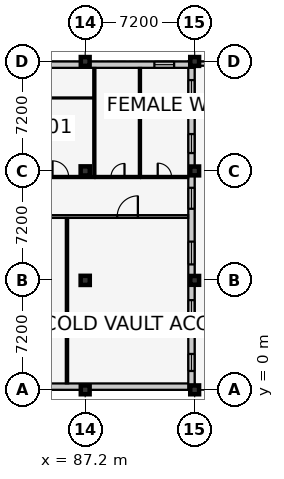
"""IFC4 building model, lengths in metres.
Left out: names, types, materials, properties, quantities, classifications, styles, units other than length and angle.
Written with IfcOpenShell. Run it as: python <this file> out.ifc"""

import sys

from ifc_helpers import new_model, si_unit, direction, frame, frame_2d, origin, origin_2d, place, context, subcontext, project, spatial, rectangle, extrude, element, fill, save


model = new_model("IFC4")
c1 = context("Model", 3, precision=1e-05, world=origin(), true_north=direction((0.0, 1.0)))
c2 = subcontext(c1, "Body", "Model", "MODEL_VIEW")
j1 = project(units=[si_unit("LENGTHUNIT", "METRE"), si_unit("PLANEANGLEUNIT", "RADIAN")], contexts=[c1])
p1 = place(None, origin())
s1 = spatial("IfcSite", under=j1, at=p1, CompositionType="ELEMENT")
p2 = place(p1, origin())
s2 = spatial("IfcBuilding", under=s1, at=p2, CompositionType="ELEMENT")
p3 = place(p2, frame((0.0, 0.0, 13.8)))
s3 = spatial("IfcBuildingStorey", under=s2, at=p3, CompositionType="ELEMENT", Elevation=13.8)
p4 = place(p3, frame((87.2, 0.0, 0.0), z_axis=(0.0, 0.0, 1.0), x_axis=(1.0, 0.0, 0.0)))
e1 = element("IfcColumn", 1, at=p4, inside=s3, PredefinedType="COLUMN", context=c2, shape_type="SweptSolid", body=[
    extrude(rectangle(XDim=0.58, YDim=0.58, at=origin_2d()), origin(), (0.0, 0.0, 1.0), 4.2),
])
for number, where, z_axis, x_axis in (
    (2, (87.2, 7.2, 0.0), (0.0, 0.0, 1.0), (1.0, 0.0, 0.0)),
    (3, (87.2, 14.4, 0.0), (0.0, 0.0, 1.0), (1.0, 0.0, 0.0)),
):
    element("IfcColumn", number, at=place(p3, frame(where, z_axis=z_axis, x_axis=x_axis)), inside=s3, PredefinedType="COLUMN", context=c2, shape_type="SweptSolid", body=[
        extrude(rectangle(XDim=0.6, YDim=0.6, at=origin_2d()), origin(), (0.0, 0.0, 1.0), 4.2),
    ])
for number, where, z_axis, x_axis in (
    (4, (87.2, 21.6, 0.0), (0.0, 0.0, 1.0), (1.0, 0.0, 0.0)),
    (5, (94.4, 0.0, 0.0), (0.0, 0.0, 1.0), (1.0, 0.0, 0.0)),
    (6, (94.4, 7.2, 0.0), (0.0, 0.0, 1.0), (1.0, 0.0, 0.0)),
    (7, (94.4, 14.4, 0.0), (0.0, 0.0, 1.0), (1.0, 0.0, 0.0)),
    (8, (94.4, 21.6, 0.0), (0.0, 0.0, 1.0), (1.0, 0.0, 0.0)),
):
    element("IfcColumn", number, at=place(p3, frame(where, z_axis=z_axis, x_axis=x_axis)), inside=s3, PredefinedType="COLUMN", context=c2, shape_type="SweptSolid", body=[
        extrude(rectangle(XDim=0.58, YDim=0.58, at=origin_2d()), origin(), (0.0, 0.0, 1.0), 4.2),
    ])
p5 = place(p3, frame((94.4, 0.21, 0.0), z_axis=(0.0, 0.0, 1.0), x_axis=(-1.0, 0.0, 0.0)))
e9 = element("IfcWall", 9, at=p5, inside=s3, PredefinedType="SOLIDWALL", context=c2, shape_type="SweptSolid", body=[
    extrude(rectangle(XDim=36.0, YDim=0.42, at=frame_2d((18.0, 0.0))), origin(), (0.0, 0.0, 1.0), 3.175),
])
p6 = place(p3, frame((94.19, 21.6, 0.0), z_axis=(0.0, 0.0, 1.0), x_axis=(0.0, -1.0, 0.0)))
e10 = element("IfcWall", 10, at=p6, inside=s3, PredefinedType="SOLIDWALL", context=c2, shape_type="SweptSolid", body=[
    extrude(rectangle(XDim=21.6, YDim=0.42, at=frame_2d((10.8, 0.0))), origin(), (0.0, 0.0, 1.0), 3.135),
])
p7 = place(p6, frame((1.225, 0.0, 0.9)))
e11 = element("IfcOpeningElement", 11, at=p7, cuts=e10, PredefinedType="OPENING", context=c2, shape_type="SweptSolid", body=[
    extrude(rectangle(XDim=1.15, YDim=1.6, at=frame_2d((0.575, 0.8))), frame((0.0, 0.222, 0.0), z_axis=(0.0, -1.0, 0.0), x_axis=(1.0, 0.0, 0.0)), (0.0, 0.0, 1.0), 0.444),
])
p8 = place(p6, frame((4.775, 0.0, 0.9)))
e12 = element("IfcOpeningElement", 12, at=p8, cuts=e10, PredefinedType="OPENING", context=c2, shape_type="SweptSolid", body=[
    extrude(rectangle(XDim=1.25, YDim=1.6, at=frame_2d((0.625, 0.8))), frame((0.0, 0.222, 0.0), z_axis=(0.0, -1.0, 0.0), x_axis=(1.0, 0.0, 0.0)), (0.0, 0.0, 1.0), 0.444),
])
p9 = place(p6, frame((8.31, 0.0, 0.9)))
e13 = element("IfcOpeningElement", 13, at=p9, cuts=e10, PredefinedType="OPENING", context=c2, shape_type="SweptSolid", body=[
    extrude(rectangle(XDim=1.38, YDim=1.6, at=frame_2d((0.69, 0.8))), frame((0.0, 0.222, 0.0), z_axis=(0.0, -1.0, 0.0), x_axis=(1.0, 0.0, 0.0)), (0.0, 0.0, 1.0), 0.444),
])
p10 = place(p6, frame((11.85, 0.0, 0.9)))
e14 = element("IfcOpeningElement", 14, at=p10, cuts=e10, PredefinedType="OPENING", context=c2, shape_type="SweptSolid", body=[
    extrude(rectangle(XDim=1.5, YDim=1.6, at=frame_2d((0.75, 0.8))), frame((0.0, 0.222, 0.0), z_axis=(0.0, -1.0, 0.0), x_axis=(1.0, 0.0, 0.0)), (0.0, 0.0, 1.0), 0.444),
])
p11 = place(p6, frame((15.7, 0.0, 0.9)))
e15 = element("IfcOpeningElement", 15, at=p11, cuts=e10, PredefinedType="OPENING", context=c2, shape_type="SweptSolid", body=[
    extrude(rectangle(XDim=1.0, YDim=1.75, at=frame_2d((0.5, 0.875))), frame((0.0, 0.222, 0.0), z_axis=(0.0, -1.0, 0.0), x_axis=(1.0, 0.0, 0.0)), (0.0, 0.0, 1.0), 0.444),
])
p12 = place(p6, frame((19.24, 0.0, 0.9)))
e16 = element("IfcOpeningElement", 16, at=p12, cuts=e10, PredefinedType="OPENING", context=c2, shape_type="SweptSolid", body=[
    extrude(rectangle(XDim=1.12, YDim=1.75, at=frame_2d((0.56, 0.875))), frame((0.0, 0.222, 0.0), z_axis=(0.0, -1.0, 0.0), x_axis=(1.0, 0.0, 0.0)), (0.0, 0.0, 1.0), 0.444),
])
p13 = place(p3, frame((58.4, 21.39, 0.0), z_axis=(0.0, 0.0, 1.0), x_axis=(1.0, 0.0, 0.0)))
e17 = element("IfcWall", 17, at=p13, inside=s3, PredefinedType="SOLIDWALL", context=c2, shape_type="SweptSolid", body=[
    extrude(rectangle(XDim=36.0, YDim=0.42, at=frame_2d((18.0, 0.0))), origin(), (0.0, 0.0, 1.0), 3.175),
])
p14 = place(p13, frame((1.38, 0.0, 0.9)))
e18 = element("IfcOpeningElement", 18, at=p14, cuts=e17, PredefinedType="OPENING", context=c2, shape_type="SweptSolid", body=[
    extrude(rectangle(XDim=1.24, YDim=1.75, at=frame_2d((0.62, 0.875))), frame((0.0, 0.222, 0.0), z_axis=(0.0, -1.0, 0.0), x_axis=(1.0, 0.0, 0.0)), (0.0, 0.0, 1.0), 0.444),
])
p15 = place(p13, frame((9.28, 0.0, 0.9)))
e19 = element("IfcOpeningElement", 19, at=p15, cuts=e17, PredefinedType="OPENING", context=c2, shape_type="SweptSolid", body=[
    extrude(rectangle(XDim=1.44, YDim=1.75, at=frame_2d((0.72, 0.875))), frame((0.0, 0.222, 0.0), z_axis=(0.0, -1.0, 0.0), x_axis=(1.0, 0.0, 0.0)), (0.0, 0.0, 1.0), 0.444),
])
p16 = place(p13, frame((17.55, 0.0, 0.9)))
e20 = element("IfcOpeningElement", 20, at=p16, cuts=e17, PredefinedType="OPENING", context=c2, shape_type="SweptSolid", body=[
    extrude(rectangle(XDim=0.9, YDim=1.35, at=frame_2d((0.45, 0.675))), frame((0.0, 0.222, 0.0), z_axis=(0.0, -1.0, 0.0), x_axis=(1.0, 0.0, 0.0)), (0.0, 0.0, 1.0), 0.444),
])
p17 = place(p13, frame((33.35, 0.0, 0.9)))
e21 = element("IfcOpeningElement", 21, at=p17, cuts=e17, PredefinedType="OPENING", context=c2, shape_type="SweptSolid", body=[
    extrude(rectangle(XDim=1.3, YDim=1.35, at=frame_2d((0.65, 0.675))), frame((0.0, 0.222, 0.0), z_axis=(0.0, -1.0, 0.0), x_axis=(1.0, 0.0, 0.0)), (0.0, 0.0, 1.0), 0.444),
])
p18 = place(p3, frame((94.55, 21.46, 0.0), z_axis=(0.0, 0.0, 1.0), x_axis=(1.0, 0.0, 0.0)))
e22 = element("IfcWall", 22, at=p18, inside=s3, PredefinedType="PARAPET", context=c2, shape_type="SweptSolid", body=[
    extrude(rectangle(XDim=6.9, YDim=0.28, at=frame_2d((3.45, 0.0))), origin(), (0.0, 0.0, 1.0), 0.65),
])
p19 = place(p3, frame((58.83, 11.4, 0.0), z_axis=(0.0, 0.0, 1.0), x_axis=(1.0, 0.0, 0.0)))
e23 = element("IfcWall", 23, at=p19, inside=s3, PredefinedType="PARTITIONING", context=c2, shape_type="SweptSolid", body=[
    extrude(rectangle(XDim=35.14, YDim=0.18, at=frame_2d((17.57, 0.0))), origin(), (0.0, 0.0, 1.0), 3.88),
])
p20 = place(p19, frame((6.995, 0.0, 0.0)))
e24 = element("IfcOpeningElement", 24, at=p20, cuts=e23, PredefinedType="OPENING", context=c2, shape_type="SweptSolid", body=[
    extrude(rectangle(XDim=1.18, YDim=2.2, at=frame_2d((0.59, 1.1))), frame((0.0, 0.102, 0.0), z_axis=(0.0, -1.0, 0.0), x_axis=(1.0, 0.0, 0.0)), (0.0, 0.0, 1.0), 0.204),
])
p21 = place(p19, frame((20.61, 0.0, 0.0)))
e25 = element("IfcOpeningElement", 25, at=p21, cuts=e23, PredefinedType="OPENING", context=c2, shape_type="SweptSolid", body=[
    extrude(rectangle(XDim=1.12, YDim=2.15, at=frame_2d((0.56, 1.075))), frame((0.0, 0.102, 0.0), z_axis=(0.0, -1.0, 0.0), x_axis=(1.0, 0.0, 0.0)), (0.0, 0.0, 1.0), 0.204),
])
p22 = place(p19, frame((30.475, 0.0, 0.0)))
e26 = element("IfcOpeningElement", 26, at=p22, cuts=e23, PredefinedType="OPENING", context=c2, shape_type="SweptSolid", body=[
    extrude(rectangle(XDim=1.36, YDim=2.2, at=frame_2d((0.68, 1.1))), frame((0.0, 0.102, 0.0), z_axis=(0.0, -1.0, 0.0), x_axis=(1.0, 0.0, 0.0)), (0.0, 0.0, 1.0), 0.204),
])
p23 = place(p3, frame((86.0, 0.43, 0.0), z_axis=(0.0, 0.0, 1.0), x_axis=(0.0, 1.0, 0.0)))
e27 = element("IfcWall", 27, at=p23, inside=s3, PredefinedType="PARTITIONING", context=c2, shape_type="SweptSolid", body=[
    extrude(rectangle(XDim=10.87, YDim=0.15, at=frame_2d((5.435, 0.0))), origin(), (0.0, 0.0, 1.0), 3.88),
])
p24 = place(p3, frame((84.8, 14.0, 0.0), z_axis=(0.0, 0.0, 1.0), x_axis=(1.0, 0.0, 0.0)))
e28 = element("IfcWall", 28, at=p24, inside=s3, PredefinedType="PARTITIONING", context=c2, shape_type="SweptSolid", body=[
    extrude(rectangle(XDim=3.0, YDim=0.14, at=frame_2d((1.5, 0.0))), origin(), (0.0, 0.0, 1.0), 3.88),
])
p25 = place(p24, frame((0.25, 0.0, 0.0)))
e29 = element("IfcOpeningElement", 29, at=p25, cuts=e28, PredefinedType="OPENING", context=c2, shape_type="SweptSolid", body=[
    extrude(rectangle(XDim=1.06, YDim=2.1, at=frame_2d((0.53, 1.05))), frame((0.0, 0.082, 0.0), z_axis=(0.0, -1.0, 0.0), x_axis=(1.0, 0.0, 0.0)), (0.0, 0.0, 1.0), 0.164),
])
p26 = place(p3, frame((87.8, 14.08, 0.0), z_axis=(0.0, 0.0, 1.0), x_axis=(0.0, 1.0, 0.0)))
e30 = element("IfcWall", 30, at=p26, inside=s3, PredefinedType="PARTITIONING", context=c2, shape_type="SweptSolid", body=[
    extrude(rectangle(XDim=7.09, YDim=0.14, at=frame_2d((3.545, 0.0))), origin(), (0.0, 0.0, 1.0), 3.88),
])
p27 = place(p3, frame((87.88, 14.0, 0.0), z_axis=(0.0, 0.0, 1.0), x_axis=(1.0, 0.0, 0.0)))
e31 = element("IfcWall", 31, at=p27, inside=s3, PredefinedType="PARTITIONING", context=c2, shape_type="SweptSolid", body=[
    extrude(rectangle(XDim=2.92, YDim=0.14, at=frame_2d((1.46, 0.0))), origin(), (0.0, 0.0, 1.0), 3.88),
])
p28 = place(p27, frame((1.015, 0.0, 0.0)))
e32 = element("IfcOpeningElement", 32, at=p28, cuts=e31, PredefinedType="OPENING", context=c2, shape_type="SweptSolid", body=[
    extrude(rectangle(XDim=0.89, YDim=2.05, at=frame_2d((0.445, 1.025))), frame((0.0, 0.082, 0.0), z_axis=(0.0, -1.0, 0.0), x_axis=(1.0, 0.0, 0.0)), (0.0, 0.0, 1.0), 0.164),
])
p29 = place(p3, frame((90.8, 14.08, 0.0), z_axis=(0.0, 0.0, 1.0), x_axis=(0.0, 1.0, 0.0)))
e33 = element("IfcWall", 33, at=p29, inside=s3, PredefinedType="PARTITIONING", context=c2, shape_type="SweptSolid", body=[
    extrude(rectangle(XDim=7.09, YDim=0.14, at=frame_2d((3.545, 0.0))), origin(), (0.0, 0.0, 1.0), 3.495),
])
p30 = place(p3, frame((90.88, 14.0, 0.0), z_axis=(0.0, 0.0, 1.0), x_axis=(1.0, 0.0, 0.0)))
e34 = element("IfcWall", 34, at=p30, inside=s3, PredefinedType="PARTITIONING", context=c2, shape_type="SweptSolid", body=[
    extrude(rectangle(XDim=3.09, YDim=0.14, at=frame_2d((1.545, 0.0))), origin(), (0.0, 0.0, 1.0), 3.88),
])
p31 = place(p30, frame((1.09, 0.0, 0.0)))
e35 = element("IfcOpeningElement", 35, at=p31, cuts=e34, PredefinedType="OPENING", context=c2, shape_type="SweptSolid", body=[
    extrude(rectangle(XDim=0.91, YDim=2.06, at=frame_2d((0.455, 1.03))), frame((0.0, 0.082, 0.0), z_axis=(0.0, -1.0, 0.0), x_axis=(1.0, 0.0, 0.0)), (0.0, 0.0, 1.0), 0.164),
])
p32 = place(p7, origin())
e36 = element("IfcWindow", 36, at=p32, inside=s3, PartitioningType="SINGLE_PANEL", PredefinedType="WINDOW", context=c2, shape_type="SweptSolid", body=[
    extrude(rectangle(XDim=1.15, YDim=1.6, at=frame_2d((0.575, 0.8))), frame((0.0, 0.03, 0.0), z_axis=(0.0, -1.0, 0.0), x_axis=(1.0, 0.0, 0.0)), (0.0, 0.0, 1.0), 0.06),
])
fill(e11, e36)
p33 = place(p8, origin())
e37 = element("IfcWindow", 37, at=p33, inside=s3, PartitioningType="SINGLE_PANEL", PredefinedType="WINDOW", context=c2, shape_type="SweptSolid", body=[
    extrude(rectangle(XDim=1.25, YDim=1.6, at=frame_2d((0.625, 0.8))), frame((0.0, 0.03, 0.0), z_axis=(0.0, -1.0, 0.0), x_axis=(1.0, 0.0, 0.0)), (0.0, 0.0, 1.0), 0.06),
])
fill(e12, e37)
p34 = place(p9, origin())
e38 = element("IfcWindow", 38, at=p34, inside=s3, PartitioningType="SINGLE_PANEL", PredefinedType="WINDOW", context=c2, shape_type="SweptSolid", body=[
    extrude(rectangle(XDim=1.38, YDim=1.6, at=frame_2d((0.69, 0.8))), frame((0.0, 0.03, 0.0), z_axis=(0.0, -1.0, 0.0), x_axis=(1.0, 0.0, 0.0)), (0.0, 0.0, 1.0), 0.06),
])
fill(e13, e38)
p35 = place(p10, origin())
e39 = element("IfcWindow", 39, at=p35, inside=s3, PartitioningType="SINGLE_PANEL", PredefinedType="WINDOW", context=c2, shape_type="SweptSolid", body=[
    extrude(rectangle(XDim=1.5, YDim=1.6, at=frame_2d((0.75, 0.8))), frame((0.0, 0.03, 0.0), z_axis=(0.0, -1.0, 0.0), x_axis=(1.0, 0.0, 0.0)), (0.0, 0.0, 1.0), 0.06),
])
fill(e14, e39)
p36 = place(p11, origin())
e40 = element("IfcWindow", 40, at=p36, inside=s3, PartitioningType="SINGLE_PANEL", PredefinedType="WINDOW", context=c2, shape_type="SweptSolid", body=[
    extrude(rectangle(XDim=1.0, YDim=1.75, at=frame_2d((0.5, 0.875))), frame((0.0, 0.03, 0.0), z_axis=(0.0, -1.0, 0.0), x_axis=(1.0, 0.0, 0.0)), (0.0, 0.0, 1.0), 0.06),
])
fill(e15, e40)
p37 = place(p12, origin())
e41 = element("IfcWindow", 41, at=p37, inside=s3, PartitioningType="SINGLE_PANEL", PredefinedType="WINDOW", context=c2, shape_type="SweptSolid", body=[
    extrude(rectangle(XDim=1.12, YDim=1.75, at=frame_2d((0.56, 0.875))), frame((0.0, 0.03, 0.0), z_axis=(0.0, -1.0, 0.0), x_axis=(1.0, 0.0, 0.0)), (0.0, 0.0, 1.0), 0.06),
])
fill(e16, e41)
p38 = place(p17, origin())
e42 = element("IfcWindow", 42, at=p38, inside=s3, PartitioningType="SINGLE_PANEL", PredefinedType="WINDOW", context=c2, shape_type="SweptSolid", body=[
    extrude(rectangle(XDim=1.3, YDim=1.35, at=frame_2d((0.65, 0.675))), frame((0.0, 0.03, 0.0), z_axis=(0.0, -1.0, 0.0), x_axis=(1.0, 0.0, 0.0)), (0.0, 0.0, 1.0), 0.06),
])
fill(e21, e42)
p39 = place(p22, origin())
e43 = element("IfcDoor", 43, at=p39, inside=s3, OperationType="SINGLE_SWING_RIGHT", PredefinedType="DOOR", context=c2, shape_type="SweptSolid", body=[
    extrude(rectangle(XDim=1.36, YDim=2.2, at=frame_2d((0.68, 1.1))), frame((0.0, 0.025, 0.0), z_axis=(0.0, -1.0, 0.0), x_axis=(1.0, 0.0, 0.0)), (0.0, 0.0, 1.0), 0.05),
])
fill(e26, e43)
p40 = place(p25, origin())
e44 = element("IfcDoor", 44, at=p40, inside=s3, OperationType="SINGLE_SWING_LEFT", PredefinedType="DOOR", context=c2, shape_type="SweptSolid", body=[
    extrude(rectangle(XDim=1.06, YDim=2.1, at=frame_2d((0.53, 1.05))), frame((0.0, 0.025, 0.0), z_axis=(0.0, -1.0, 0.0), x_axis=(1.0, 0.0, 0.0)), (0.0, 0.0, 1.0), 0.05),
])
fill(e29, e44)
p41 = place(p28, origin())
e45 = element("IfcDoor", 45, at=p41, inside=s3, OperationType="SINGLE_SWING_RIGHT", PredefinedType="DOOR", context=c2, shape_type="SweptSolid", body=[
    extrude(rectangle(XDim=0.89, YDim=2.05, at=frame_2d((0.445, 1.025))), frame((0.0, 0.025, 0.0), z_axis=(0.0, -1.0, 0.0), x_axis=(1.0, 0.0, 0.0)), (0.0, 0.0, 1.0), 0.05),
])
fill(e32, e45)
p42 = place(p31, origin())
e46 = element("IfcDoor", 46, at=p42, inside=s3, OperationType="SINGLE_SWING_LEFT", PredefinedType="DOOR", context=c2, shape_type="SweptSolid", body=[
    extrude(rectangle(XDim=0.91, YDim=2.06, at=frame_2d((0.455, 1.03))), frame((0.0, 0.025, 0.0), z_axis=(0.0, -1.0, 0.0), x_axis=(1.0, 0.0, 0.0)), (0.0, 0.0, 1.0), 0.05),
])
fill(e35, e46)
save(model, sys.argv[1])
